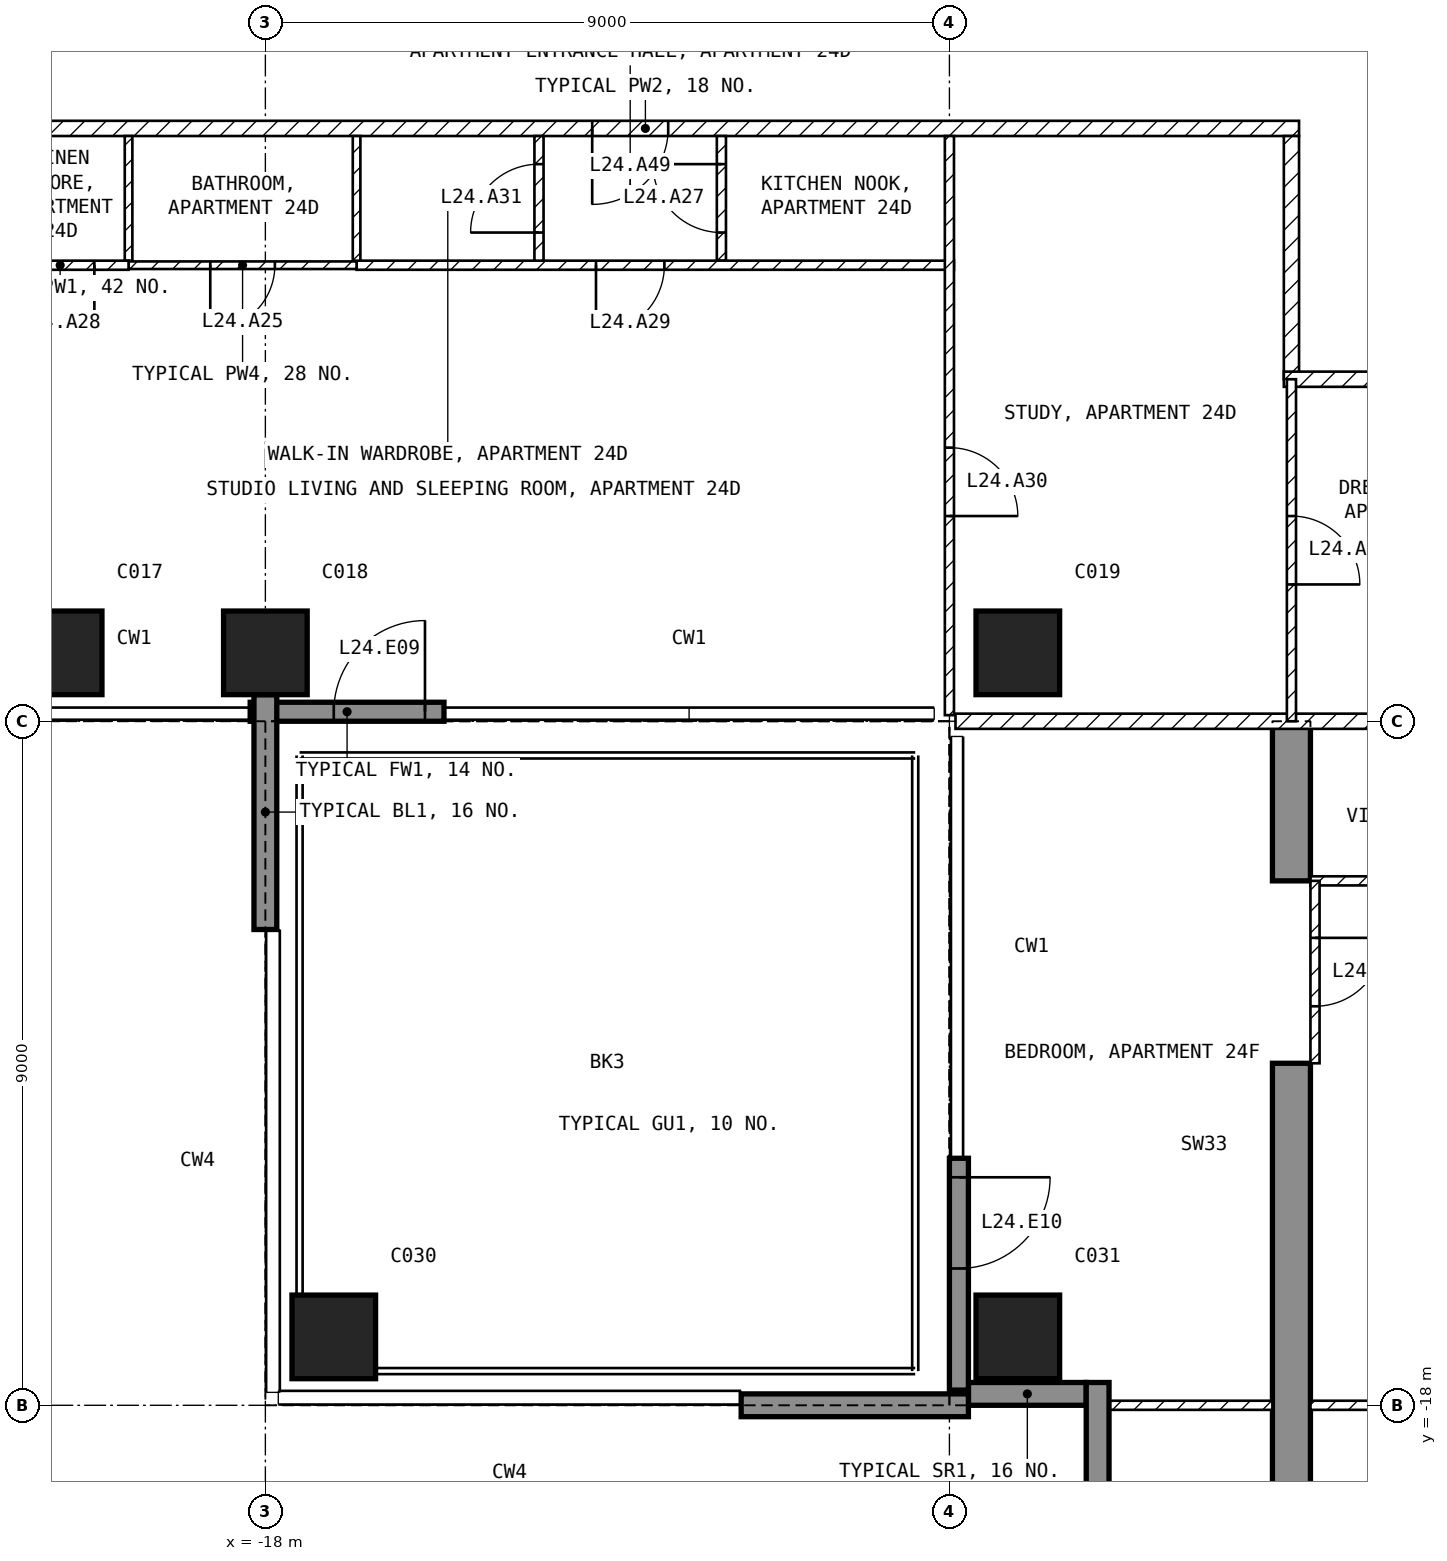
"""IFC4 building model, lengths in metres.
Left out: names, types, materials, properties, quantities, classifications, styles, units other than length and angle.
Written with IfcOpenShell. Run it as: python <this file> out.ifc"""

import sys

from ifc_helpers import new_model, si_unit, direction, frame, frame_2d, origin, origin_2d, place, context, subcontext, project, spatial, polyline, rectangle, outline, extrude, element, fill, save


model = new_model("IFC4")
c1 = context("Model", 3, precision=1e-05, world=origin(), true_north=direction((0.0, 1.0)))
c2 = subcontext(c1, "Body", "Model", "MODEL_VIEW")
j1 = project(units=[si_unit("LENGTHUNIT", "METRE"), si_unit("PLANEANGLEUNIT", "RADIAN")], contexts=[c1])
p1 = place(None, origin())
s1 = spatial("IfcSite", under=j1, at=p1, CompositionType="ELEMENT")
p2 = place(p1, origin())
s2 = spatial("IfcBuilding", under=s1, at=p2, CompositionType="ELEMENT")
p3 = place(p2, frame((0.0, 0.0, 105.9)))
s3 = spatial("IfcBuildingStorey", under=s2, at=p3, CompositionType="ELEMENT", Elevation=105.9)
for number, where, z_axis, x_axis in (
    (1, (-20.7, -8.1, -0.25), (0.0, 0.0, 1.0), (1.0, 0.0, 0.0)),
    (2, (-18.0, -8.1, -0.25), (0.0, 0.0, 1.0), (1.0, 0.0, 0.0)),
    (3, (-8.1, -17.1, -0.25), (0.0, 0.0, 1.0), (1.0, 0.0, 0.0)),
    (4, (-8.1, -8.1, -0.25), (0.0, 0.0, 1.0), (1.0, 0.0, 0.0)),
    (5, (-17.1, -17.1, -0.25), (0.0, 0.0, 1.0), (1.0, 0.0, 0.0)),
):
    element("IfcColumn", number, at=place(p3, frame(where, z_axis=z_axis, x_axis=x_axis)), inside=s3, PredefinedType="COLUMN", context=c2, shape_type="SweptSolid", body=[
        extrude(rectangle(XDim=1.1, YDim=1.1, at=origin_2d()), origin(), (0.0, 0.0, 1.0), 3.5),
    ])
p4 = place(p3, frame((-4.75, -20.15, -0.25), z_axis=(1.0, 0.0, 0.0), x_axis=(0.0, 1.0, 0.0)))
e6 = element("IfcWall", 6, at=p4, inside=s3, PredefinedType="SHEAR", context=c2, shape_type="SweptSolid", body=[
    extrude(outline(polyline([(0.0, 0.0), (6.65, 0.0), (6.65, 2.65), (9.05, 2.65), (9.05, 0.0), (11.15, 0.0), (11.15, 3.5), (0.0, 3.5), (0.0, 0.0)])), origin(), (0.0, 0.0, 1.0), 0.5),
])
p5 = place(p3, frame((-18.2, -8.875, 0.0), z_axis=(0.0, 0.0, 1.0), x_axis=(1.0, 0.0, 0.0)))
e7 = element("IfcWall", 7, at=p5, inside=s3, PredefinedType="SOLIDWALL", context=c2, shape_type="SweptSolid", body=[
    extrude(rectangle(XDim=2.55, YDim=0.25, at=frame_2d((1.275, 0.0))), origin(), (0.0, 0.0, 1.0), 3.25),
])
p6 = place(p5, frame((1.1, 0.0, 0.0)))
e8 = element("IfcOpeningElement", 8, at=p6, cuts=e7, PredefinedType="OPENING", context=c2, shape_type="SweptSolid", body=[
    extrude(rectangle(XDim=1.2, YDim=2.4, at=frame_2d((0.6, 1.2))), frame((0.0, 0.135, 0.0), z_axis=(0.0, -1.0, 0.0), x_axis=(1.0, 0.0, 0.0)), (0.0, 0.0, 1.0), 0.27),
])
p7 = place(p3, frame((-8.875, -14.75, 0.0), z_axis=(0.0, 0.0, 1.0), x_axis=(0.0, -1.0, 0.0)))
e9 = element("IfcWall", 9, at=p7, inside=s3, PredefinedType="SOLIDWALL", context=c2, shape_type="SweptSolid", body=[
    extrude(rectangle(XDim=3.05, YDim=0.25, at=frame_2d((1.525, 0.0))), origin(), (0.0, 0.0, 1.0), 3.25),
])
p8 = place(p7, frame((0.25, 0.0, 0.0)))
e10 = element("IfcOpeningElement", 10, at=p8, cuts=e9, PredefinedType="OPENING", context=c2, shape_type="SweptSolid", body=[
    extrude(rectangle(XDim=1.2, YDim=2.4, at=frame_2d((0.6, 1.2))), frame((0.0, 0.135, 0.0), z_axis=(0.0, -1.0, 0.0), x_axis=(1.0, 0.0, 0.0)), (0.0, 0.0, 1.0), 0.27),
])
p9 = place(p3, frame((-8.75, -17.85, 0.0), z_axis=(0.0, 0.0, 1.0), x_axis=(1.0, 0.0, 0.0)))
e11 = element("IfcWall", 11, at=p9, inside=s3, PredefinedType="SOLIDWALL", context=c2, shape_type="SweptSolid", body=[
    extrude(rectangle(XDim=1.55, YDim=0.3, at=frame_2d((0.775, 0.0))), origin(), (0.0, 0.0, 1.0), 3.25),
])
p10 = place(p3, frame((-7.05, -17.7, 0.0), z_axis=(0.0, 0.0, 1.0), x_axis=(0.0, -1.0, 0.0)))
e12 = element("IfcWall", 12, at=p10, inside=s3, PredefinedType="SOLIDWALL", context=c2, shape_type="SweptSolid", body=[
    extrude(rectangle(XDim=1.8, YDim=0.3, at=frame_2d((0.9, 0.0))), origin(), (0.0, 0.0, 1.0), 3.25),
])
p11 = place(p3, frame((-18.0, -8.65, 0.0), z_axis=(0.0, 0.0, 1.0), x_axis=(0.0, -1.0, 0.0)))
e13 = element("IfcWall", 13, at=p11, inside=s3, PredefinedType="SOLIDWALL", context=c2, shape_type="SweptSolid", body=[
    extrude(rectangle(XDim=3.09, YDim=0.3, at=frame_2d((1.545, 0.0))), origin(), (0.0, 0.0, 1.0), 3.25),
])
p12 = place(p3, frame((-8.75, -18.0, 0.0), z_axis=(0.0, 0.0, 1.0), x_axis=(-1.0, 0.0, 0.0)))
e14 = element("IfcWall", 14, at=p12, inside=s3, PredefinedType="SOLIDWALL", context=c2, shape_type="SweptSolid", body=[
    extrude(rectangle(XDim=2.99, YDim=0.3, at=frame_2d((1.495, 0.0))), origin(), (0.0, 0.0, 1.0), 3.25),
])
p13 = place(p3, frame((-4.4, -1.2, 0.0), z_axis=(0.0, 0.0, 1.0), x_axis=(-1.0, 0.0, 0.0)))
e15 = element("IfcWall", 15, at=p13, inside=s3, PredefinedType="PARTITIONING", context=c2, shape_type="SweptSolid", body=[
    extrude(rectangle(XDim=17.2, YDim=0.2, at=frame_2d((8.6, 0.0))), origin(), (0.0, 0.0, 1.0), 3.25),
])
p14 = place(p13, frame((8.3, 0.0, 0.0)))
e16 = element("IfcOpeningElement", 16, at=p14, cuts=e15, PredefinedType="OPENING", context=c2, shape_type="SweptSolid", body=[
    extrude(rectangle(XDim=1.0, YDim=2.1, at=frame_2d((0.5, 1.05))), frame((0.0, 0.11, 0.0), z_axis=(0.0, -1.0, 0.0), x_axis=(1.0, 0.0, 0.0)), (0.0, 0.0, 1.0), 0.22),
])
p15 = place(p3, frame((-4.5, -4.5, 0.0), z_axis=(0.0, 0.0, 1.0), x_axis=(0.0, 1.0, 0.0)))
e17 = element("IfcWall", 17, at=p15, inside=s3, PredefinedType="PARTITIONING", context=c2, shape_type="SweptSolid", body=[
    extrude(rectangle(XDim=3.2, YDim=0.2, at=frame_2d((1.6, 0.0))), origin(), (0.0, 0.0, 1.0), 3.25),
])
p16 = place(p3, frame((-1.1, -4.5, 0.0), z_axis=(0.0, 0.0, 1.0), x_axis=(-1.0, 0.0, 0.0)))
e18 = element("IfcWall", 18, at=p16, inside=s3, PredefinedType="PARTITIONING", context=c2, shape_type="SweptSolid", body=[
    extrude(rectangle(XDim=3.5, YDim=0.2, at=frame_2d((1.75, 0.0))), origin(), (0.0, 0.0, 1.0), 3.25),
])
p17 = place(p3, frame((8.92, -9.0, 0.0), z_axis=(0.0, 0.0, 1.0), x_axis=(-1.0, 0.0, 0.0)))
e19 = element("IfcWall", 19, at=p17, inside=s3, PredefinedType="PARTITIONING", context=c2, shape_type="SweptSolid", body=[
    extrude(rectangle(XDim=17.84, YDim=0.2, at=frame_2d((8.92, 0.0))), origin(), (0.0, 0.0, 1.0), 3.25),
])
p18 = place(p17, frame((8.42, 0.0, 0.0)))
e20 = element("IfcOpeningElement", 20, at=p18, cuts=e19, PredefinedType="OPENING", context=c2, shape_type="SweptSolid", body=[
    extrude(rectangle(XDim=1.0, YDim=2.1, at=frame_2d((0.5, 1.05))), frame((0.0, 0.11, 0.0), z_axis=(0.0, -1.0, 0.0), x_axis=(1.0, 0.0, 0.0)), (0.0, 0.0, 1.0), 0.22),
])
p19 = place(p3, frame((-12.0, -2.94, 0.0), z_axis=(0.0, 0.0, 1.0), x_axis=(0.0, 1.0, 0.0)))
e21 = element("IfcWall", 21, at=p19, inside=s3, PredefinedType="PARTITIONING", context=c2, shape_type="SweptSolid", body=[
    extrude(rectangle(XDim=1.64, YDim=0.12, at=frame_2d((0.82, 0.0))), origin(), (0.0, 0.0, 1.0), 3.25),
])
p20 = place(p19, frame((0.37, 0.0, 0.0)))
e22 = element("IfcOpeningElement", 22, at=p20, cuts=e21, PredefinedType="OPENING", context=c2, shape_type="SweptSolid", body=[
    extrude(rectangle(XDim=0.9, YDim=2.1, at=frame_2d((0.45, 1.05))), frame((0.0, 0.07, 0.0), z_axis=(0.0, -1.0, 0.0), x_axis=(1.0, 0.0, 0.0)), (0.0, 0.0, 1.0), 0.14),
])
p21 = place(p3, frame((-8.94, -3.0, 0.0), z_axis=(0.0, 0.0, 1.0), x_axis=(-1.0, 0.0, 0.0)))
e23 = element("IfcWall", 23, at=p21, inside=s3, PredefinedType="PARTITIONING", context=c2, shape_type="SweptSolid", body=[
    extrude(rectangle(XDim=7.86, YDim=0.12, at=frame_2d((3.93, 0.0))), origin(), (0.0, 0.0, 1.0), 3.25),
])
p22 = place(p21, frame((3.81, 0.0, 0.0)))
e24 = element("IfcOpeningElement", 24, at=p22, cuts=e23, PredefinedType="OPENING", context=c2, shape_type="SweptSolid", body=[
    extrude(rectangle(XDim=0.9, YDim=2.1, at=frame_2d((0.45, 1.05))), frame((0.0, 0.07, 0.0), z_axis=(0.0, -1.0, 0.0), x_axis=(1.0, 0.0, 0.0)), (0.0, 0.0, 1.0), 0.14),
])
p23 = place(p3, frame((-9.0, -1.3, 0.0), z_axis=(0.0, 0.0, 1.0), x_axis=(0.0, -1.0, 0.0)))
e25 = element("IfcWall", 25, at=p23, inside=s3, PredefinedType="PARTITIONING", context=c2, shape_type="SweptSolid", body=[
    extrude(rectangle(XDim=7.62, YDim=0.12, at=frame_2d((3.81, 0.0))), origin(), (0.0, 0.0, 1.0), 3.25),
])
p24 = place(p23, frame((4.1, 0.0, 0.0)))
e26 = element("IfcOpeningElement", 26, at=p24, cuts=e25, PredefinedType="OPENING", context=c2, shape_type="SweptSolid", body=[
    extrude(rectangle(XDim=0.9, YDim=2.1, at=frame_2d((0.45, 1.05))), frame((0.0, 0.07, 0.0), z_axis=(0.0, -1.0, 0.0), x_axis=(1.0, 0.0, 0.0)), (0.0, 0.0, 1.0), 0.14),
])
p25 = place(p3, frame((-14.4, -2.94, 0.0), z_axis=(0.0, 0.0, 1.0), x_axis=(0.0, 1.0, 0.0)))
e27 = element("IfcWall", 27, at=p25, inside=s3, PredefinedType="PARTITIONING", context=c2, shape_type="SweptSolid", body=[
    extrude(rectangle(XDim=1.64, YDim=0.12, at=frame_2d((0.82, 0.0))), origin(), (0.0, 0.0, 1.0), 3.25),
])
p26 = place(p25, frame((0.37, 0.0, 0.0)))
e28 = element("IfcOpeningElement", 28, at=p26, cuts=e27, PredefinedType="OPENING", context=c2, shape_type="SweptSolid", body=[
    extrude(rectangle(XDim=0.9, YDim=2.1, at=frame_2d((0.45, 1.05))), frame((0.0, 0.07, 0.0), z_axis=(0.0, -1.0, 0.0), x_axis=(1.0, 0.0, 0.0)), (0.0, 0.0, 1.0), 0.14),
])
for number, where, z_axis, x_axis in (
    (29, (-16.8, -2.94, 0.0), (0.0, 0.0, 1.0), (0.0, 1.0, 0.0)),
    (30, (-19.8, -2.94, 0.0), (0.0, 0.0, 1.0), (0.0, 1.0, 0.0)),
):
    element("IfcWall", number, at=place(p3, frame(where, z_axis=z_axis, x_axis=x_axis)), inside=s3, PredefinedType="PARTITIONING", context=c2, shape_type="SweptSolid", body=[
        extrude(rectangle(XDim=1.64, YDim=0.1, at=frame_2d((0.82, 0.0))), origin(), (0.0, 0.0, 1.0), 3.25),
    ])
p27 = place(p3, frame((-16.8, -3.0, 0.0), z_axis=(0.0, 0.0, 1.0), x_axis=(-1.0, 0.0, 0.0)))
e31 = element("IfcWall", 31, at=p27, inside=s3, PredefinedType="PARTITIONING", context=c2, shape_type="SweptSolid", body=[
    extrude(rectangle(XDim=3.0, YDim=0.1, at=frame_2d((1.5, 0.0))), origin(), (0.0, 0.0, 1.0), 3.25),
])
p28 = place(p27, frame((1.075, 0.0, 0.0)))
e32 = element("IfcOpeningElement", 32, at=p28, cuts=e31, PredefinedType="OPENING", context=c2, shape_type="SweptSolid", body=[
    extrude(rectangle(XDim=0.85, YDim=2.1, at=frame_2d((0.425, 1.05))), frame((0.0, 0.06, 0.0), z_axis=(0.0, -1.0, 0.0), x_axis=(1.0, 0.0, 0.0)), (0.0, 0.0, 1.0), 0.12),
])
p29 = place(p3, frame((-19.8, -3.0, 0.0), z_axis=(0.0, 0.0, 1.0), x_axis=(-1.0, 0.0, 0.0)))
e33 = element("IfcWall", 33, at=p29, inside=s3, PredefinedType="PARTITIONING", context=c2, shape_type="SweptSolid", body=[
    extrude(rectangle(XDim=1.8, YDim=0.12, at=frame_2d((0.9, 0.0))), origin(), (0.0, 0.0, 1.0), 3.25),
])
p30 = place(p29, frame((0.45, 0.0, 0.0)))
e34 = element("IfcOpeningElement", 34, at=p30, cuts=e33, PredefinedType="OPENING", context=c2, shape_type="SweptSolid", body=[
    extrude(rectangle(XDim=0.9, YDim=2.1, at=frame_2d((0.45, 1.05))), frame((0.0, 0.07, 0.0), z_axis=(0.0, -1.0, 0.0), x_axis=(1.0, 0.0, 0.0)), (0.0, 0.0, 1.0), 0.14),
])
p31 = place(p3, frame((-4.5, -4.5, 0.0), z_axis=(0.0, 0.0, 1.0), x_axis=(0.0, -1.0, 0.0)))
e35 = element("IfcWall", 35, at=p31, inside=s3, PredefinedType="PARTITIONING", context=c2, shape_type="SweptSolid", body=[
    extrude(rectangle(XDim=4.5, YDim=0.12, at=frame_2d((2.25, 0.0))), origin(), (0.0, 0.0, 1.0), 3.25),
])
p32 = place(p31, frame((1.8, 0.0, 0.0)))
e36 = element("IfcOpeningElement", 36, at=p32, cuts=e35, PredefinedType="OPENING", context=c2, shape_type="SweptSolid", body=[
    extrude(rectangle(XDim=0.9, YDim=2.1, at=frame_2d((0.45, 1.05))), frame((0.0, 0.07, 0.0), z_axis=(0.0, -1.0, 0.0), x_axis=(1.0, 0.0, 0.0)), (0.0, 0.0, 1.0), 0.14),
])
p33 = place(p3, frame((2.1, -11.1, 0.0), z_axis=(0.0, 0.0, 1.0), x_axis=(-1.0, 0.0, 0.0)))
e37 = element("IfcWall", 37, at=p33, inside=s3, PredefinedType="PARTITIONING", context=c2, shape_type="SweptSolid", body=[
    extrude(rectangle(XDim=6.35, YDim=0.12, at=frame_2d((3.175, 0.0))), origin(), (0.0, 0.0, 1.0), 3.25),
])
p34 = place(p33, frame((2.725, 0.0, 0.0)))
e38 = element("IfcOpeningElement", 38, at=p34, cuts=e37, PredefinedType="OPENING", context=c2, shape_type="SweptSolid", body=[
    extrude(rectangle(XDim=0.9, YDim=2.1, at=frame_2d((0.45, 1.05))), frame((0.0, 0.07, 0.0), z_axis=(0.0, -1.0, 0.0), x_axis=(1.0, 0.0, 0.0)), (0.0, 0.0, 1.0), 0.14),
])
p35 = place(p3, frame((4.25, -18.0, 0.0), z_axis=(0.0, 0.0, 1.0), x_axis=(-1.0, 0.0, 0.0)))
e39 = element("IfcWall", 39, at=p35, inside=s3, PredefinedType="PARTITIONING", context=c2, shape_type="SweptSolid", body=[
    extrude(rectangle(XDim=8.5, YDim=0.12, at=frame_2d((4.25, 0.0))), origin(), (0.0, 0.0, 1.0), 3.25),
])
p36 = place(p35, frame((5.675, 0.0, 0.0)))
e40 = element("IfcOpeningElement", 40, at=p36, cuts=e39, PredefinedType="OPENING", context=c2, shape_type="SweptSolid", body=[
    extrude(rectangle(XDim=0.9, YDim=2.1, at=frame_2d((0.45, 1.05))), frame((0.0, 0.07, 0.0), z_axis=(0.0, -1.0, 0.0), x_axis=(1.0, 0.0, 0.0)), (0.0, 0.0, 1.0), 0.14),
])
p37 = place(p3, frame((-4.75, -18.0, 0.0), z_axis=(0.0, 0.0, 1.0), x_axis=(-1.0, 0.0, 0.0)))
e41 = element("IfcWall", 41, at=p37, inside=s3, PredefinedType="PARTITIONING", context=c2, shape_type="SweptSolid", body=[
    extrude(rectangle(XDim=2.37, YDim=0.12, at=frame_2d((1.185, 0.0))), origin(), (0.0, 0.0, 1.0), 3.25),
])
p38 = place(p3, frame((-4.19, -11.1, 0.0), z_axis=(0.0, 0.0, 1.0), x_axis=(0.0, -1.0, 0.0)))
e42 = element("IfcWall", 42, at=p38, inside=s3, PredefinedType="PARTITIONING", context=c2, shape_type="SweptSolid", body=[
    extrude(rectangle(XDim=2.4, YDim=0.12, at=frame_2d((1.2, 0.0))), origin(), (0.0, 0.0, 1.0), 2.4),
])
p39 = place(p38, frame((0.75, 0.0, 0.0)))
e43 = element("IfcOpeningElement", 43, at=p39, cuts=e42, PredefinedType="OPENING", context=c2, shape_type="SweptSolid", body=[
    extrude(rectangle(XDim=0.9, YDim=2.1, at=frame_2d((0.45, 1.05))), frame((0.0, 0.07, 0.0), z_axis=(0.0, -1.0, 0.0), x_axis=(1.0, 0.0, 0.0)), (0.0, 0.0, 1.0), 0.14),
])
p40 = place(p6, origin())
e44 = element("IfcDoor", 44, at=p40, inside=s3, OperationType="SINGLE_SWING_RIGHT", PredefinedType="DOOR", context=c2, shape_type="SweptSolid", body=[
    extrude(rectangle(XDim=1.2, YDim=2.4, at=frame_2d((0.6, 1.2))), frame((0.0, 0.025, 0.0), z_axis=(0.0, -1.0, 0.0), x_axis=(1.0, 0.0, 0.0)), (0.0, 0.0, 1.0), 0.05),
])
fill(e8, e44)
p41 = place(p8, origin())
e45 = element("IfcDoor", 45, at=p41, inside=s3, OperationType="SINGLE_SWING_LEFT", PredefinedType="DOOR", context=c2, shape_type="SweptSolid", body=[
    extrude(rectangle(XDim=1.2, YDim=2.4, at=frame_2d((0.6, 1.2))), frame((0.0, 0.025, 0.0), z_axis=(0.0, -1.0, 0.0), x_axis=(1.0, 0.0, 0.0)), (0.0, 0.0, 1.0), 0.05),
])
fill(e10, e45)
p42 = place(p28, origin())
e46 = element("IfcDoor", 46, at=p42, inside=s3, OperationType="SINGLE_SWING_RIGHT", PredefinedType="DOOR", context=c2, shape_type="SweptSolid", body=[
    extrude(rectangle(XDim=0.85, YDim=2.1, at=frame_2d((0.425, 1.05))), frame((0.0, 0.025, 0.0), z_axis=(0.0, -1.0, 0.0), x_axis=(1.0, 0.0, 0.0)), (0.0, 0.0, 1.0), 0.05),
])
fill(e32, e46)
p43 = place(p32, origin())
e47 = element("IfcDoor", 47, at=p43, inside=s3, OperationType="SINGLE_SWING_RIGHT", PredefinedType="DOOR", context=c2, shape_type="SweptSolid", body=[
    extrude(rectangle(XDim=0.9, YDim=2.1, at=frame_2d((0.45, 1.05))), frame((0.0, 0.025, 0.0), z_axis=(0.0, -1.0, 0.0), x_axis=(1.0, 0.0, 0.0)), (0.0, 0.0, 1.0), 0.05),
])
fill(e36, e47)
p44 = place(p20, origin())
e48 = element("IfcDoor", 48, at=p44, inside=s3, OperationType="SINGLE_SWING_RIGHT", PredefinedType="DOOR", context=c2, shape_type="SweptSolid", body=[
    extrude(rectangle(XDim=0.9, YDim=2.1, at=frame_2d((0.45, 1.05))), frame((0.0, 0.025, 0.0), z_axis=(0.0, -1.0, 0.0), x_axis=(1.0, 0.0, 0.0)), (0.0, 0.0, 1.0), 0.05),
])
fill(e22, e48)
p45 = place(p30, origin())
e49 = element("IfcDoor", 49, at=p45, inside=s3, OperationType="SINGLE_SWING_LEFT", PredefinedType="DOOR", context=c2, shape_type="SweptSolid", body=[
    extrude(rectangle(XDim=0.9, YDim=2.1, at=frame_2d((0.45, 1.05))), frame((0.0, 0.025, 0.0), z_axis=(0.0, -1.0, 0.0), x_axis=(1.0, 0.0, 0.0)), (0.0, 0.0, 1.0), 0.05),
])
fill(e34, e49)
p46 = place(p22, origin())
e50 = element("IfcDoor", 50, at=p46, inside=s3, OperationType="SINGLE_SWING_RIGHT", PredefinedType="DOOR", context=c2, shape_type="SweptSolid", body=[
    extrude(rectangle(XDim=0.9, YDim=2.1, at=frame_2d((0.45, 1.05))), frame((0.0, 0.025, 0.0), z_axis=(0.0, -1.0, 0.0), x_axis=(1.0, 0.0, 0.0)), (0.0, 0.0, 1.0), 0.05),
])
fill(e24, e50)
p47 = place(p24, origin())
e51 = element("IfcDoor", 51, at=p47, inside=s3, OperationType="SINGLE_SWING_RIGHT", PredefinedType="DOOR", context=c2, shape_type="SweptSolid", body=[
    extrude(rectangle(XDim=0.9, YDim=2.1, at=frame_2d((0.45, 1.05))), frame((0.0, 0.025, 0.0), z_axis=(0.0, -1.0, 0.0), x_axis=(1.0, 0.0, 0.0)), (0.0, 0.0, 1.0), 0.05),
])
fill(e26, e51)
p48 = place(p26, origin())
e52 = element("IfcDoor", 52, at=p48, inside=s3, OperationType="SINGLE_SWING_LEFT", PredefinedType="DOOR", context=c2, shape_type="SweptSolid", body=[
    extrude(rectangle(XDim=0.9, YDim=2.1, at=frame_2d((0.45, 1.05))), frame((0.0, 0.025, 0.0), z_axis=(0.0, -1.0, 0.0), x_axis=(1.0, 0.0, 0.0)), (0.0, 0.0, 1.0), 0.05),
])
fill(e28, e52)
p49 = place(p14, origin())
e53 = element("IfcDoor", 53, at=p49, inside=s3, OperationType="SINGLE_SWING_RIGHT", PredefinedType="DOOR", context=c2, shape_type="SweptSolid", body=[
    extrude(rectangle(XDim=1.0, YDim=2.1, at=frame_2d((0.5, 1.05))), frame((0.0, 0.025, 0.0), z_axis=(0.0, -1.0, 0.0), x_axis=(1.0, 0.0, 0.0)), (0.0, 0.0, 1.0), 0.05),
])
fill(e16, e53)
p50 = place(p39, origin())
e54 = element("IfcDoor", 54, at=p50, inside=s3, OperationType="SINGLE_SWING_LEFT", PredefinedType="DOOR", context=c2, shape_type="SweptSolid", body=[
    extrude(rectangle(XDim=0.9, YDim=2.1, at=frame_2d((0.45, 1.05))), frame((0.0, 0.025, 0.0), z_axis=(0.0, -1.0, 0.0), x_axis=(1.0, 0.0, 0.0)), (0.0, 0.0, 1.0), 0.05),
])
fill(e43, e54)
save(model, sys.argv[1])
